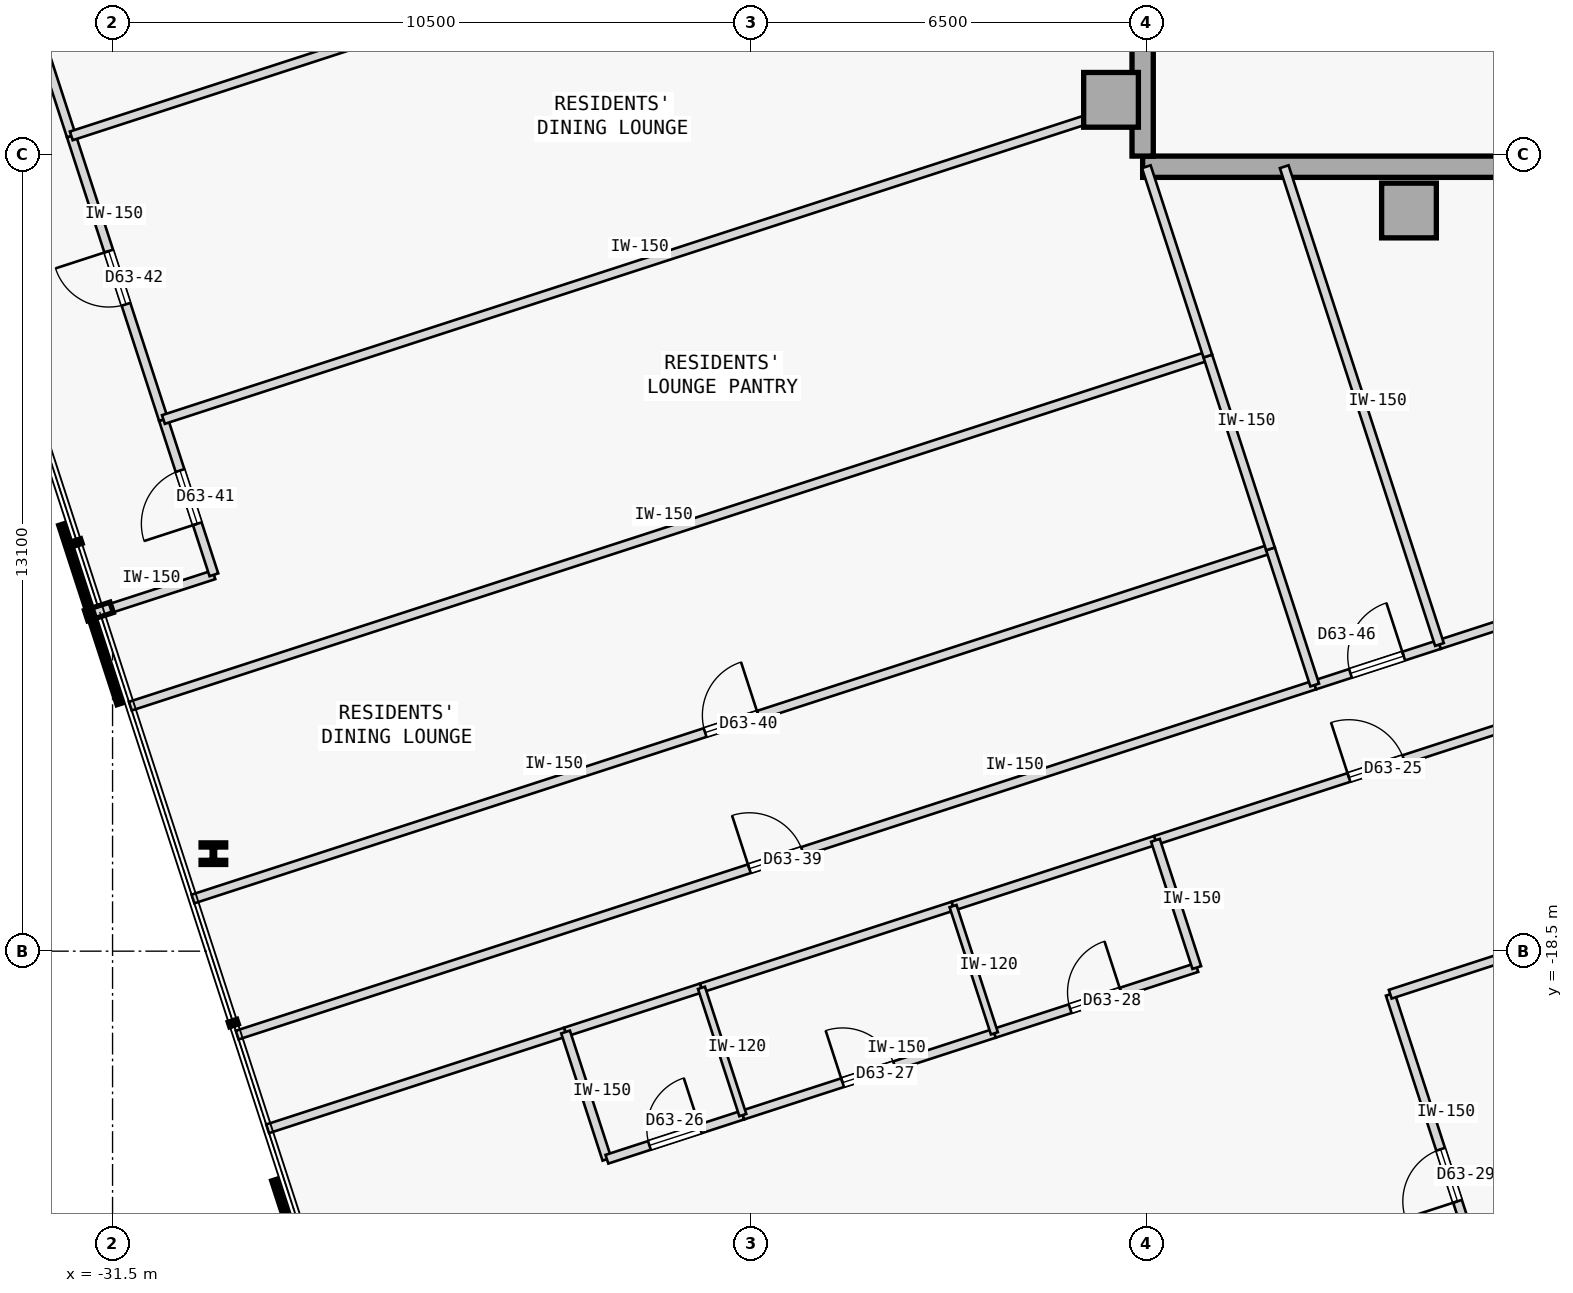
"""IFC4 building model, lengths in metres.
Left out: names, types, materials, properties, quantities, classifications, styles, units other than length and angle.
Written with IfcOpenShell. Run it as: python <this file> out.ifc"""

import sys

from ifc_helpers import new_model, si_unit, direction, frame, frame_2d, origin, origin_2d, place, context, subcontext, project, spatial, rectangle, i_section, extrude, element, fill, save


model = new_model("IFC4")
c1 = context("Model", 3, precision=1e-05, world=origin(), true_north=direction((0.0, 1.0)))
c2 = subcontext(c1, "Body", "Model", "MODEL_VIEW")
j1 = project(units=[si_unit("LENGTHUNIT", "METRE"), si_unit("PLANEANGLEUNIT", "RADIAN")], contexts=[c1])
p1 = place(None, origin())
s1 = spatial("IfcSite", under=j1, at=p1, CompositionType="ELEMENT")
p2 = place(p1, origin())
s2 = spatial("IfcBuilding", under=s1, at=p2, CompositionType="ELEMENT")
p3 = place(p2, frame((0.0, 0.0, 237.7)))
s3 = spatial("IfcBuildingStorey", under=s2, at=p3, CompositionType="ELEMENT", Elevation=237.7)
for number, where, z_axis, x_axis in (
    (1, (-15.08, -4.5, 0.0), (0.0, 0.0, 1.0), (1.0, 0.0, 0.0)),
    (2, (-10.18, -6.32, 0.0), (0.0, 0.0, 1.0), (1.0, 0.0, 0.0)),
):
    element("IfcColumn", number, at=place(p3, frame(where, z_axis=z_axis, x_axis=x_axis)), inside=s3, PredefinedType="COLUMN", context=c2, shape_type="SweptSolid", body=[
        extrude(rectangle(XDim=0.9, YDim=0.9, at=origin_2d()), origin(), (0.0, 0.0, 1.0), 3.35),
    ])
p4 = place(p3, frame((-14.56, -5.6, 0.0), z_axis=(0.0, 0.0, 1.0), x_axis=(1.0, 0.0, 0.0)))
e3 = element("IfcWall", 3, at=p4, inside=s3, PredefinedType="SHEAR", context=c2, shape_type="SweptSolid", body=[
    extrude(rectangle(XDim=10.86, YDim=0.35, at=frame_2d((5.43, 0.0))), origin(), (0.0, 0.0, 1.0), 3.125),
])
p5 = place(p3, frame((-14.56, -5.425, 0.0), z_axis=(0.0, 0.0, 1.0), x_axis=(0.0, 1.0, 0.0)))
e4 = element("IfcWall", 4, at=p5, inside=s3, PredefinedType="SHEAR", context=c2, shape_type="SweptSolid", body=[
    extrude(rectangle(XDim=10.85, YDim=0.35, at=frame_2d((5.425, 0.0))), origin(), (0.0, 0.0, 1.0), 3.125),
])
p6 = place(p3, frame((-29.842, -16.897, 0.0), z_axis=(0.0, 0.0, 1.0), x_axis=(1.0, 0.0, 0.0)))
e5 = element("IfcColumn", 5, at=p6, inside=s3, PredefinedType="COLUMN", context=c2, shape_type="SweptSolid", body=[
    extrude(i_section(OverallWidth=0.405, OverallDepth=0.355, WebThickness=0.042, FlangeThickness=0.068, FilletRadius=0.015, at=origin_2d()), origin(), (0.0, 0.0, 1.0), 3.35),
])
p7 = place(p3, frame((-28.95, -21.421, 0.0), z_axis=(0.0, 0.0, 1.0), x_axis=(0.951058442388, 0.309011066408, 0.0)))
e6 = element("IfcWall", 6, at=p7, inside=s3, PredefinedType="PARTITIONING", context=c2, shape_type="SweptSolid", body=[
    extrude(rectangle(XDim=5.152, YDim=0.15, at=frame_2d((2.576, 0.0))), origin(), (0.0, 0.0, 1.0), 3.125),
])
p8 = place(p3, frame((-14.349, -16.677, 0.0), z_axis=(0.0, 0.0, 1.0), x_axis=(0.951058958043, 0.309009479345, 0.0)))
e7 = element("IfcWall", 7, at=p8, inside=s3, PredefinedType="PARTITIONING", context=c2, shape_type="SweptSolid", body=[
    extrude(rectangle(XDim=7.64, YDim=0.15, at=frame_2d((3.82, 0.0))), origin(), (0.0, 0.0, 1.0), 3.125),
])
p9 = place(p8, frame((3.345, 0.0, 0.0)))
e8 = element("IfcOpeningElement", 8, at=p9, cuts=e7, PredefinedType="OPENING", context=c2, shape_type="SweptSolid", body=[
    extrude(rectangle(XDim=0.95, YDim=2.15, at=frame_2d((0.475, 1.075))), frame((0.0, 0.085, 0.0), z_axis=(0.0, -1.0, 0.0), x_axis=(1.0, 0.0, 0.0)), (0.0, 0.0, 1.0), 0.17),
])
p10 = place(p3, frame((-24.05, -19.829, 0.0), z_axis=(0.0, 0.0, 1.0), x_axis=(0.951035595692, 0.309081373955, 0.0)))
e9 = element("IfcWall", 9, at=p10, inside=s3, PredefinedType="PARTITIONING", context=c2, shape_type="SweptSolid", body=[
    extrude(rectangle(XDim=2.35, YDim=0.15, at=frame_2d((1.175, 0.0))), origin(), (0.0, 0.0, 1.0), 3.125),
])
p11 = place(p3, frame((-21.815, -19.103, 0.0), z_axis=(0.0, 0.0, 1.0), x_axis=(0.951057987102, 0.309012467661, 0.0)))
e10 = element("IfcWall", 10, at=p11, inside=s3, PredefinedType="PARTITIONING", context=c2, shape_type="SweptSolid", body=[
    extrude(rectangle(XDim=4.35, YDim=0.15, at=frame_2d((2.175, 0.0))), origin(), (0.0, 0.0, 1.0), 3.125),
])
p12 = place(p3, frame((-17.678, -17.759, 0.0), z_axis=(0.0, 0.0, 1.0), x_axis=(0.951055596592, 0.309019824916, 0.0)))
e11 = element("IfcWall", 11, at=p12, inside=s3, PredefinedType="PARTITIONING", context=c2, shape_type="SweptSolid", body=[
    extrude(rectangle(XDim=3.5, YDim=0.15, at=frame_2d((1.75, 0.0))), origin(), (0.0, 0.0, 1.0), 3.125),
])
p13 = place(p3, frame((-29.45, -19.881, 0.0), z_axis=(0.0, 0.0, 1.0), x_axis=(0.95105650271, 0.309017036186, 0.0)))
e12 = element("IfcWall", 12, at=p13, inside=s3, PredefinedType="PARTITIONING", context=c2, shape_type="SweptSolid", body=[
    extrude(rectangle(XDim=18.632, YDim=0.15, at=frame_2d((9.316, 0.0))), origin(), (0.0, 0.0, 1.0), 3.125),
])
p14 = place(p13, frame((8.856, 0.0, 0.0)))
e13 = element("IfcOpeningElement", 13, at=p14, cuts=e12, PredefinedType="OPENING", context=c2, shape_type="SweptSolid", body=[
    extrude(rectangle(XDim=0.92, YDim=2.15, at=frame_2d((0.46, 1.075))), frame((0.0, 0.085, 0.0), z_axis=(0.0, -1.0, 0.0), x_axis=(1.0, 0.0, 0.0)), (0.0, 0.0, 1.0), 0.17),
])
p15 = place(p3, frame((-31.712, -12.921, 0.0), z_axis=(0.0, 0.0, 1.0), x_axis=(0.951054051148, 0.309024581215, 0.0)))
e14 = element("IfcWall", 14, at=p15, inside=s3, PredefinedType="PARTITIONING", context=c2, shape_type="SweptSolid", body=[
    extrude(rectangle(XDim=1.975, YDim=0.15, at=frame_2d((0.988, 0.0))), origin(), (0.0, 0.0, 1.0), 3.125),
])
p16 = place(p3, frame((-29.833, -12.311, 0.0), z_axis=(0.0, 0.0, 1.0), x_axis=(-0.309044953986, 0.951047431213, 0.0)))
e15 = element("IfcWall", 15, at=p16, inside=s3, PredefinedType="PARTITIONING", context=c2, shape_type="SweptSolid", body=[
    extrude(rectangle(XDim=2.685, YDim=0.15, at=frame_2d((1.343, 0.0))), origin(), (0.0, 0.0, 1.0), 3.125),
])
p17 = place(p16, frame((0.883, 0.0, 0.0)))
e16 = element("IfcOpeningElement", 16, at=p17, cuts=e15, PredefinedType="OPENING", context=c2, shape_type="SweptSolid", body=[
    extrude(rectangle(XDim=0.92, YDim=2.15, at=frame_2d((0.46, 1.075))), frame((0.0, 0.085, 0.0), z_axis=(0.0, -1.0, 0.0), x_axis=(1.0, 0.0, 0.0)), (0.0, 0.0, 1.0), 0.17),
])
p18 = place(p3, frame((-30.663, -9.757, 0.0), z_axis=(0.0, 0.0, 1.0), x_axis=(-0.309019653166, 0.951055652397, 0.0)))
e17 = element("IfcWall", 17, at=p18, inside=s3, PredefinedType="PARTITIONING", context=c2, shape_type="SweptSolid", body=[
    extrude(rectangle(XDim=4.904, YDim=0.15, at=frame_2d((2.452, 0.0))), origin(), (0.0, 0.0, 1.0), 3.125),
])
p19 = place(p18, frame((1.992, 0.0, 0.0)))
e18 = element("IfcOpeningElement", 18, at=p19, cuts=e17, PredefinedType="OPENING", context=c2, shape_type="SweptSolid", body=[
    extrude(rectangle(XDim=0.92, YDim=2.15, at=frame_2d((0.46, 1.075))), frame((0.0, 0.085, 0.0), z_axis=(0.0, -1.0, 0.0), x_axis=(1.0, 0.0, 0.0)), (0.0, 0.0, 1.0), 0.17),
])
p20 = place(p3, frame((-32.179, -5.093, 0.0), z_axis=(0.0, 0.0, 1.0), x_axis=(-0.309014532869, 0.951057316083, 0.0)))
e19 = element("IfcWall", 19, at=p20, inside=s3, PredefinedType="PARTITIONING", context=c2, shape_type="SweptSolid", body=[
    extrude(rectangle(XDim=4.707, YDim=0.15, at=frame_2d((2.354, 0.0))), origin(), (0.0, 0.0, 1.0), 3.125),
])
p21 = place(p3, frame((-11.73, -14.123, 0.0), z_axis=(0.0, 0.0, 1.0), x_axis=(0.951066501686, 0.308986260812, 0.0)))
e20 = element("IfcWall", 20, at=p21, inside=s3, PredefinedType="PARTITIONING", context=c2, shape_type="SweptSolid", body=[
    extrude(rectangle(XDim=2.157, YDim=0.15, at=frame_2d((1.079, 0.0))), origin(), (0.0, 0.0, 1.0), 3.125),
])
p22 = place(p21, frame((0.618, 0.0, 0.0)))
e21 = element("IfcOpeningElement", 21, at=p22, cuts=e20, PredefinedType="OPENING", context=c2, shape_type="SweptSolid", body=[
    extrude(rectangle(XDim=0.92, YDim=2.15, at=frame_2d((0.46, 1.075))), frame((0.0, 0.085, 0.0), z_axis=(0.0, -1.0, 0.0), x_axis=(1.0, 0.0, 0.0)), (0.0, 0.0, 1.0), 0.17),
])
p23 = place(p3, frame((-9.679, -13.457, 0.0), z_axis=(0.0, 0.0, 1.0), x_axis=(0.951054104561, 0.309024416831, 0.0)))
e22 = element("IfcWall", 22, at=p23, inside=s3, PredefinedType="PARTITIONING", context=c2, shape_type="SweptSolid", body=[
    extrude(rectangle(XDim=3.492, YDim=0.15, at=frame_2d((1.746, 0.0))), origin(), (0.0, 0.0, 1.0), 3.125),
])
p24 = place(p23, frame((1.286, 0.0, 0.0)))
e23 = element("IfcOpeningElement", 23, at=p24, cuts=e22, PredefinedType="OPENING", context=c2, shape_type="SweptSolid", body=[
    extrude(rectangle(XDim=0.92, YDim=2.15, at=frame_2d((0.46, 1.075))), frame((0.0, 0.085, 0.0), z_axis=(0.0, -1.0, 0.0), x_axis=(1.0, 0.0, 0.0)), (0.0, 0.0, 1.0), 0.17),
])
p25 = place(p3, frame((-23.37, -21.922, 0.0), z_axis=(0.0, 0.0, 1.0), x_axis=(-0.308960600764, 0.951074837842, 0.0)))
e24 = element("IfcWall", 24, at=p25, inside=s3, PredefinedType="PARTITIONING", context=c2, shape_type="SweptSolid", body=[
    extrude(rectangle(XDim=2.2, YDim=0.15, at=frame_2d((1.1, 0.0))), origin(), (0.0, 0.0, 1.0), 3.125),
])
p26 = place(p3, frame((-23.37, -21.922, 0.0), z_axis=(0.0, 0.0, 1.0), x_axis=(0.951045519245, 0.309050837767, 0.0)))
e25 = element("IfcWall", 25, at=p26, inside=s3, PredefinedType="PARTITIONING", context=c2, shape_type="SweptSolid", body=[
    extrude(rectangle(XDim=2.35, YDim=0.15, at=frame_2d((1.175, 0.0))), origin(), (0.0, 0.0, 1.0), 3.125),
])
p27 = place(p26, frame((0.735, 0.0, 0.0)))
e26 = element("IfcOpeningElement", 26, at=p27, cuts=e25, PredefinedType="OPENING", context=c2, shape_type="SweptSolid", body=[
    extrude(rectangle(XDim=0.88, YDim=2.15, at=frame_2d((0.44, 1.075))), frame((0.0, 0.085, 0.0), z_axis=(0.0, -1.0, 0.0), x_axis=(1.0, 0.0, 0.0)), (0.0, 0.0, 1.0), 0.17),
])
p28 = place(p3, frame((-21.135, -21.195, 0.0), z_axis=(0.0, 0.0, 1.0), x_axis=(0.951069122051, 0.308978195154, 0.0)))
e27 = element("IfcWall", 27, at=p28, inside=s3, PredefinedType="PARTITIONING", context=c2, shape_type="SweptSolid", body=[
    extrude(rectangle(XDim=4.35, YDim=0.15, at=frame_2d((2.175, 0.0))), origin(), (0.0, 0.0, 1.0), 3.125),
])
p29 = place(p28, frame((1.725, 0.0, 0.0)))
e28 = element("IfcOpeningElement", 28, at=p29, cuts=e27, PredefinedType="OPENING", context=c2, shape_type="SweptSolid", body=[
    extrude(rectangle(XDim=0.9, YDim=2.15, at=frame_2d((0.45, 1.075))), frame((0.0, 0.085, 0.0), z_axis=(0.0, -1.0, 0.0), x_axis=(1.0, 0.0, 0.0)), (0.0, 0.0, 1.0), 0.17),
])
p30 = place(p3, frame((-16.998, -19.851, 0.0), z_axis=(0.0, 0.0, 1.0), x_axis=(0.951041757107, 0.309062414796, 0.0)))
e29 = element("IfcWall", 29, at=p30, inside=s3, PredefinedType="PARTITIONING", context=c2, shape_type="SweptSolid", body=[
    extrude(rectangle(XDim=3.5, YDim=0.15, at=frame_2d((1.75, 0.0))), origin(), (0.0, 0.0, 1.0), 3.125),
])
p31 = place(p30, frame((1.31, 0.0, 0.0)))
e30 = element("IfcOpeningElement", 30, at=p31, cuts=e29, PredefinedType="OPENING", context=c2, shape_type="SweptSolid", body=[
    extrude(rectangle(XDim=0.88, YDim=2.15, at=frame_2d((0.44, 1.075))), frame((0.0, 0.085, 0.0), z_axis=(0.0, -1.0, 0.0), x_axis=(1.0, 0.0, 0.0)), (0.0, 0.0, 1.0), 0.17),
])
p32 = place(p3, frame((-13.669, -18.77, 0.0), z_axis=(0.0, 0.0, 1.0), x_axis=(-0.309060979314, 0.951042223598, 0.0)))
e31 = element("IfcWall", 31, at=p32, inside=s3, PredefinedType="PARTITIONING", context=c2, shape_type="SweptSolid", body=[
    extrude(rectangle(XDim=2.2, YDim=0.15, at=frame_2d((1.1, 0.0))), origin(), (0.0, 0.0, 1.0), 3.125),
])
p33 = place(p3, frame((-8.553, -25.164, 0.0), z_axis=(0.0, 0.0, 1.0), x_axis=(-0.309013782848, 0.951057559777, 0.0)))
e32 = element("IfcWall", 32, at=p33, inside=s3, PredefinedType="PARTITIONING", context=c2, shape_type="SweptSolid", body=[
    extrude(rectangle(XDim=6.262, YDim=0.15, at=frame_2d((3.131, 0.0))), origin(), (0.0, 0.0, 1.0), 3.125),
])
p34 = place(p33, frame((2.681, 0.0, 0.0)))
e33 = element("IfcOpeningElement", 33, at=p34, cuts=e32, PredefinedType="OPENING", context=c2, shape_type="SweptSolid", body=[
    extrude(rectangle(XDim=0.9, YDim=2.15, at=frame_2d((0.45, 1.075))), frame((0.0, 0.085, 0.0), z_axis=(0.0, -1.0, 0.0), x_axis=(1.0, 0.0, 0.0)), (0.0, 0.0, 1.0), 0.17),
])
p35 = place(p3, frame((-10.488, -19.208, 0.0), z_axis=(0.0, 0.0, 1.0), x_axis=(0.951050272606, 0.309036209813, 0.0)))
e34 = element("IfcWall", 34, at=p35, inside=s3, PredefinedType="PARTITIONING", context=c2, shape_type="SweptSolid", body=[
    extrude(rectangle(XDim=4.65, YDim=0.15, at=frame_2d((2.325, 0.0))), origin(), (0.0, 0.0, 1.0), 3.125),
])
p36 = place(p3, frame((-21.135, -21.195, 0.0), z_axis=(0.0, 0.0, 1.0), x_axis=(-0.309060979314, 0.951042223598, 0.0)))
e35 = element("IfcWall", 35, at=p36, inside=s3, PredefinedType="PARTITIONING", context=c2, shape_type="SweptSolid", body=[
    extrude(rectangle(XDim=2.2, YDim=0.12, at=frame_2d((1.1, 0.0))), origin(), (0.0, 0.0, 1.0), 3.125),
])
p37 = place(p3, frame((-16.998, -19.851, 0.0), z_axis=(0.0, 0.0, 1.0), x_axis=(-0.30892799396, 0.951085429679, 0.0)))
e36 = element("IfcWall", 36, at=p37, inside=s3, PredefinedType="PARTITIONING", context=c2, shape_type="SweptSolid", body=[
    extrude(rectangle(XDim=2.2, YDim=0.12, at=frame_2d((1.1, 0.0))), origin(), (0.0, 0.0, 1.0), 3.125),
])
p38 = place(p3, frame((-30.178, -17.642, 0.0), z_axis=(0.0, 0.0, 1.0), x_axis=(0.95105650271, 0.309017036186, 0.0)))
e37 = element("IfcWall", 37, at=p38, inside=s3, PredefinedType="PARTITIONING", context=c2, shape_type="SweptSolid", body=[
    extrude(rectangle(XDim=18.632, YDim=0.15, at=frame_2d((9.316, 0.0))), origin(), (0.0, 0.0, 1.0), 3.125),
])
p39 = place(p38, frame((8.856, 0.0, 0.0)))
e38 = element("IfcOpeningElement", 38, at=p39, cuts=e37, PredefinedType="OPENING", context=c2, shape_type="SweptSolid", body=[
    extrude(rectangle(XDim=0.92, YDim=2.15, at=frame_2d((0.46, 1.075))), frame((0.0, 0.085, 0.0), z_axis=(0.0, -1.0, 0.0), x_axis=(1.0, 0.0, 0.0)), (0.0, 0.0, 1.0), 0.17),
])
p40 = place(p3, frame((-11.73, -14.123, 0.0), z_axis=(0.0, 0.0, 1.0), x_axis=(-0.309062621189, 0.951041690035, 0.0)))
e39 = element("IfcWall", 39, at=p40, inside=s3, PredefinedType="PARTITIONING", context=c2, shape_type="SweptSolid", body=[
    extrude(rectangle(XDim=2.354, YDim=0.15, at=frame_2d((1.177, 0.0))), origin(), (0.0, 0.0, 1.0), 3.125),
])
p41 = place(p3, frame((-31.208, -14.471, 0.0), z_axis=(0.0, 0.0, 1.0), x_axis=(0.951057753948, 0.309013185244, 0.0)))
e40 = element("IfcWall", 40, at=p41, inside=s3, PredefinedType="PARTITIONING", context=c2, shape_type="SweptSolid", body=[
    extrude(rectangle(XDim=18.632, YDim=0.15, at=frame_2d((9.316, 0.0))), origin(), (0.0, 0.0, 1.0), 3.125),
])
p42 = place(p3, frame((-12.458, -11.884, 0.0), z_axis=(0.0, 0.0, 1.0), x_axis=(-0.308946982245, 0.951079261766, 0.0)))
e41 = element("IfcWall", 41, at=p42, inside=s3, PredefinedType="PARTITIONING", context=c2, shape_type="SweptSolid", body=[
    extrude(rectangle(XDim=3.334, YDim=0.15, at=frame_2d((1.667, 0.0))), origin(), (0.0, 0.0, 1.0), 3.125),
])
p43 = place(p3, frame((-30.663, -9.757, 0.0), z_axis=(0.0, 0.0, 1.0), x_axis=(0.951058192995, 0.309011833974, 0.0)))
e42 = element("IfcWall", 42, at=p43, inside=s3, PredefinedType="PARTITIONING", context=c2, shape_type="SweptSolid", body=[
    extrude(rectangle(XDim=16.657, YDim=0.15, at=frame_2d((8.329, 0.0))), origin(), (0.0, 0.0, 1.0), 3.125),
])
p44 = place(p3, frame((-13.488, -8.713, 0.0), z_axis=(0.0, 0.0, 1.0), x_axis=(-0.309082700143, 0.951035164687, 0.0)))
e43 = element("IfcWall", 43, at=p44, inside=s3, PredefinedType="PARTITIONING", context=c2, shape_type="SweptSolid", body=[
    extrude(rectangle(XDim=3.274, YDim=0.15, at=frame_2d((1.637, 0.0))), origin(), (0.0, 0.0, 1.0), 3.125),
])
p45 = place(p3, frame((-32.179, -5.093, 0.0), z_axis=(0.0, 0.0, 1.0), x_axis=(0.951053885426, 0.309025091239, 0.0)))
e44 = element("IfcWall", 44, at=p45, inside=s3, PredefinedType="PARTITIONING", context=c2, shape_type="SweptSolid", body=[
    extrude(rectangle(XDim=16.657, YDim=0.15, at=frame_2d((8.329, 0.0))), origin(), (0.0, 0.0, 1.0), 3.125),
])
p46 = place(p3, frame((-9.679, -13.457, 0.0), z_axis=(0.0, 0.0, 1.0), x_axis=(-0.309010558951, 0.951058607267, 0.0)))
e45 = element("IfcWall", 45, at=p46, inside=s3, PredefinedType="PARTITIONING", context=c2, shape_type="SweptSolid", body=[
    extrude(rectangle(XDim=8.261, YDim=0.15, at=frame_2d((4.13, 0.0))), origin(), (0.0, 0.0, 1.0), 3.125),
])
p47 = place(p9, origin())
e46 = element("IfcDoor", 46, at=p47, inside=s3, OperationType="SINGLE_SWING_LEFT", PredefinedType="DOOR", context=c2, shape_type="SweptSolid", body=[
    extrude(rectangle(XDim=0.95, YDim=2.15, at=frame_2d((0.475, 1.075))), frame((0.0, 0.025, 0.0), z_axis=(0.0, -1.0, 0.0), x_axis=(1.0, 0.0, 0.0)), (0.0, 0.0, 1.0), 0.05),
])
fill(e8, e46)
p48 = place(p27, origin())
e47 = element("IfcDoor", 47, at=p48, inside=s3, OperationType="SINGLE_SWING_RIGHT", PredefinedType="DOOR", context=c2, shape_type="SweptSolid", body=[
    extrude(rectangle(XDim=0.88, YDim=2.15, at=frame_2d((0.44, 1.075))), frame((0.0, 0.025, 0.0), z_axis=(0.0, -1.0, 0.0), x_axis=(1.0, 0.0, 0.0)), (0.0, 0.0, 1.0), 0.05),
])
fill(e26, e47)
p49 = place(p29, origin())
e48 = element("IfcDoor", 48, at=p49, inside=s3, OperationType="SINGLE_SWING_LEFT", PredefinedType="DOOR", context=c2, shape_type="SweptSolid", body=[
    extrude(rectangle(XDim=0.9, YDim=2.15, at=frame_2d((0.45, 1.075))), frame((0.0, 0.025, 0.0), z_axis=(0.0, -1.0, 0.0), x_axis=(1.0, 0.0, 0.0)), (0.0, 0.0, 1.0), 0.05),
])
fill(e28, e48)
p50 = place(p31, origin())
e49 = element("IfcDoor", 49, at=p50, inside=s3, OperationType="SINGLE_SWING_RIGHT", PredefinedType="DOOR", context=c2, shape_type="SweptSolid", body=[
    extrude(rectangle(XDim=0.88, YDim=2.15, at=frame_2d((0.44, 1.075))), frame((0.0, 0.025, 0.0), z_axis=(0.0, -1.0, 0.0), x_axis=(1.0, 0.0, 0.0)), (0.0, 0.0, 1.0), 0.05),
])
fill(e30, e49)
p51 = place(p34, origin())
e50 = element("IfcDoor", 50, at=p51, inside=s3, OperationType="SINGLE_SWING_LEFT", PredefinedType="DOOR", context=c2, shape_type="SweptSolid", body=[
    extrude(rectangle(XDim=0.9, YDim=2.15, at=frame_2d((0.45, 1.075))), frame((0.0, 0.025, 0.0), z_axis=(0.0, -1.0, 0.0), x_axis=(1.0, 0.0, 0.0)), (0.0, 0.0, 1.0), 0.05),
])
fill(e33, e50)
p52 = place(p14, origin())
e51 = element("IfcDoor", 51, at=p52, inside=s3, OperationType="SINGLE_SWING_LEFT", PredefinedType="DOOR", context=c2, shape_type="SweptSolid", body=[
    extrude(rectangle(XDim=0.92, YDim=2.15, at=frame_2d((0.46, 1.075))), frame((0.0, 0.025, 0.0), z_axis=(0.0, -1.0, 0.0), x_axis=(1.0, 0.0, 0.0)), (0.0, 0.0, 1.0), 0.05),
])
fill(e13, e51)
p53 = place(p39, origin())
e52 = element("IfcDoor", 52, at=p53, inside=s3, OperationType="SINGLE_SWING_RIGHT", PredefinedType="DOOR", context=c2, shape_type="SweptSolid", body=[
    extrude(rectangle(XDim=0.92, YDim=2.15, at=frame_2d((0.46, 1.075))), frame((0.0, 0.025, 0.0), z_axis=(0.0, -1.0, 0.0), x_axis=(1.0, 0.0, 0.0)), (0.0, 0.0, 1.0), 0.05),
])
fill(e38, e52)
p54 = place(p17, origin())
e53 = element("IfcDoor", 53, at=p54, inside=s3, OperationType="SINGLE_SWING_LEFT", PredefinedType="DOOR", context=c2, shape_type="SweptSolid", body=[
    extrude(rectangle(XDim=0.92, YDim=2.15, at=frame_2d((0.46, 1.075))), frame((0.0, 0.025, 0.0), z_axis=(0.0, -1.0, 0.0), x_axis=(1.0, 0.0, 0.0)), (0.0, 0.0, 1.0), 0.05),
])
fill(e16, e53)
p55 = place(p19, origin())
e54 = element("IfcDoor", 54, at=p55, inside=s3, OperationType="SINGLE_SWING_RIGHT", PredefinedType="DOOR", context=c2, shape_type="SweptSolid", body=[
    extrude(rectangle(XDim=0.92, YDim=2.15, at=frame_2d((0.46, 1.075))), frame((0.0, 0.025, 0.0), z_axis=(0.0, -1.0, 0.0), x_axis=(1.0, 0.0, 0.0)), (0.0, 0.0, 1.0), 0.05),
])
fill(e18, e54)
p56 = place(p22, origin())
e55 = element("IfcDoor", 55, at=p56, inside=s3, OperationType="SINGLE_SWING_RIGHT", PredefinedType="DOOR", context=c2, shape_type="SweptSolid", body=[
    extrude(rectangle(XDim=0.92, YDim=2.15, at=frame_2d((0.46, 1.075))), frame((0.0, 0.025, 0.0), z_axis=(0.0, -1.0, 0.0), x_axis=(1.0, 0.0, 0.0)), (0.0, 0.0, 1.0), 0.05),
])
fill(e21, e55)
save(model, sys.argv[1])
